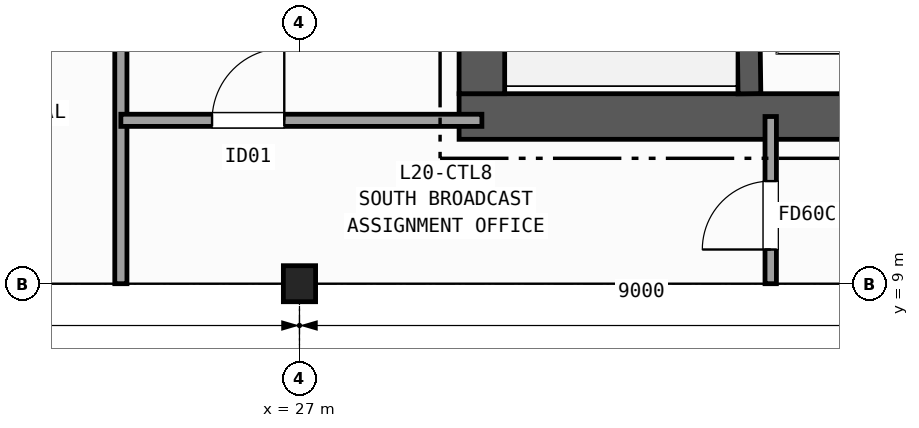
"""IFC4 building model, lengths in metres.
Left out: names, types, materials, properties, quantities, classifications, styles, units other than length and angle.
Written with IfcOpenShell. Run it as: python <this file> out.ifc"""

import sys

from ifc_helpers import new_model, si_unit, direction, frame, frame_2d, origin, origin_2d, place, context, subcontext, project, spatial, rectangle, i_section, extrude, element, fill, save


model = new_model("IFC4")
c1 = context("Model", 3, precision=1e-05, world=origin(), true_north=direction((0.0, 1.0)))
c2 = subcontext(c1, "Body", "Model", "MODEL_VIEW")
j1 = project(units=[si_unit("LENGTHUNIT", "METRE"), si_unit("PLANEANGLEUNIT", "RADIAN")], contexts=[c1])
p1 = place(None, origin())
s1 = spatial("IfcSite", under=j1, at=p1, CompositionType="ELEMENT")
p2 = place(p1, origin())
s2 = spatial("IfcBuilding", under=s1, at=p2, CompositionType="ELEMENT")
p3 = place(p2, frame((0.0, 0.0, 84.1)))
s3 = spatial("IfcBuildingStorey", under=s2, at=p3, CompositionType="ELEMENT", Elevation=84.1)
p4 = place(p3, frame((27.0, 9.0, 0.0), z_axis=(0.0, 0.0, 1.0), x_axis=(1.0, 0.0, 0.0)))
e1 = element("IfcColumn", 1, at=p4, inside=s3, PredefinedType="COLUMN", context=c2, shape_type="SweptSolid", body=[
    extrude(i_section(OverallWidth=0.424, OverallDepth=0.474, WebThickness=0.048, FlangeThickness=0.077, FilletRadius=0.015, at=origin_2d()), origin(), (0.0, 0.0, 1.0), 5.0),
])
p5 = place(p3, frame((29.1, 11.2, 0.0), z_axis=(0.0, 0.0, 1.0), x_axis=(1.0, 0.0, 0.0)))
e2 = element("IfcWall", 2, at=p5, inside=s3, PredefinedType="SHEAR", context=c2, shape_type="SweptSolid", body=[
    extrude(rectangle(XDim=14.0, YDim=0.6, at=frame_2d((7.0, 0.0))), origin(), (0.0, 0.0, 1.0), 4.72),
])
p6 = place(p3, frame((29.4, 24.3, 0.0), z_axis=(0.0, 0.0, 1.0), x_axis=(0.0, -1.0, 0.0)))
e3 = element("IfcWall", 3, at=p6, inside=s3, PredefinedType="SHEAR", context=c2, shape_type="SweptSolid", body=[
    extrude(rectangle(XDim=12.8, YDim=0.6, at=frame_2d((6.4, 0.0))), origin(), (0.0, 0.0, 1.0), 4.72),
])
p7 = place(p6, frame((1.4, 0.0, 0.0)))
e4 = element("IfcOpeningElement", 4, at=p7, cuts=e3, PredefinedType="OPENING", context=c2, shape_type="SweptSolid", body=[
    extrude(rectangle(XDim=1.35, YDim=2.15, at=frame_2d((0.675, 1.075))), frame((0.0, 0.31, 0.0), z_axis=(0.0, -1.0, 0.0), x_axis=(1.0, 0.0, 0.0)), (0.0, 0.0, 1.0), 0.62),
])
p8 = place(p3, frame((32.92, 11.5, 0.0), z_axis=(0.0, 0.0, 1.0), x_axis=(-0.013244407292, 0.999912288991, 0.0)))
e5 = element("IfcWall", 5, at=p8, inside=s3, PredefinedType="SHEAR", context=c2, shape_type="SweptSolid", body=[
    extrude(rectangle(XDim=9.051, YDim=0.3, at=frame_2d((4.525, 0.0))), origin(), (0.0, 0.0, 1.0), 4.72),
])
p9 = place(p3, frame((24.65, 9.0, 0.0), z_axis=(0.0, 0.0, 1.0), x_axis=(0.0, 1.0, 0.0)))
e6 = element("IfcWall", 6, at=p9, inside=s3, PredefinedType="PARTITIONING", context=c2, shape_type="SweptSolid", body=[
    extrude(rectangle(XDim=19.2, YDim=0.16, at=frame_2d((9.6, 0.0))), origin(), (0.0, 0.0, 1.0), 3.927),
])
p10 = place(p9, frame((12.2, 0.0, 0.0)))
e7 = element("IfcOpeningElement", 7, at=p10, cuts=e6, PredefinedType="OPENING", context=c2, shape_type="SweptSolid", body=[
    extrude(rectangle(XDim=0.95, YDim=2.1, at=frame_2d((0.475, 1.05))), frame((0.0, 0.09, 0.0), z_axis=(0.0, -1.0, 0.0), x_axis=(1.0, 0.0, 0.0)), (0.0, 0.0, 1.0), 0.18),
])
p11 = place(p9, frame((4.2, 0.0, 0.0)))
e8 = element("IfcOpeningElement", 8, at=p11, cuts=e6, PredefinedType="OPENING", context=c2, shape_type="SweptSolid", body=[
    extrude(rectangle(XDim=1.0, YDim=2.1, at=frame_2d((0.5, 1.05))), frame((0.0, 0.09, 0.0), z_axis=(0.0, -1.0, 0.0), x_axis=(1.0, 0.0, 0.0)), (0.0, 0.0, 1.0), 0.18),
])
p12 = place(p3, frame((24.65, 11.15, 0.0), z_axis=(0.0, 0.0, 1.0), x_axis=(1.0, 0.0, 0.0)))
e9 = element("IfcWall", 9, at=p12, inside=s3, PredefinedType="PARTITIONING", context=c2, shape_type="SweptSolid", body=[
    extrude(rectangle(XDim=4.75, YDim=0.16, at=frame_2d((2.375, 0.0))), origin(), (0.0, 0.0, 1.0), 4.092),
])
p13 = place(p12, frame((1.2, 0.0, 0.0)))
e10 = element("IfcOpeningElement", 10, at=p13, cuts=e9, PredefinedType="OPENING", context=c2, shape_type="SweptSolid", body=[
    extrude(rectangle(XDim=0.95, YDim=2.1, at=frame_2d((0.475, 1.05))), frame((0.0, 0.09, 0.0), z_axis=(0.0, -1.0, 0.0), x_axis=(1.0, 0.0, 0.0)), (0.0, 0.0, 1.0), 0.18),
])
p14 = place(p3, frame((33.2, 9.0, 0.0), z_axis=(0.0, 0.0, 1.0), x_axis=(0.0, 1.0, 0.0)))
e11 = element("IfcWall", 11, at=p14, inside=s3, PredefinedType="PARTITIONING", context=c2, shape_type="SweptSolid", body=[
    extrude(rectangle(XDim=2.2, YDim=0.15, at=frame_2d((1.1, 0.0))), origin(), (0.0, 0.0, 1.0), 3.927),
])
p15 = place(p14, frame((0.45, 0.0, 0.0)))
e12 = element("IfcOpeningElement", 12, at=p15, cuts=e11, PredefinedType="OPENING", context=c2, shape_type="SweptSolid", body=[
    extrude(rectangle(XDim=0.9, YDim=2.1, at=frame_2d((0.45, 1.05))), frame((0.0, 0.085, 0.0), z_axis=(0.0, -1.0, 0.0), x_axis=(1.0, 0.0, 0.0)), (0.0, 0.0, 1.0), 0.17),
])
p16 = place(p13, origin())
e13 = element("IfcDoor", 13, at=p16, inside=s3, OperationType="SINGLE_SWING_RIGHT", PredefinedType="DOOR", context=c2, shape_type="SweptSolid", body=[
    extrude(rectangle(XDim=0.95, YDim=2.1, at=frame_2d((0.475, 1.05))), frame((0.0, 0.025, 0.0), z_axis=(0.0, -1.0, 0.0), x_axis=(1.0, 0.0, 0.0)), (0.0, 0.0, 1.0), 0.05),
])
fill(e10, e13)
p17 = place(p15, origin())
e14 = element("IfcDoor", 14, at=p17, inside=s3, OperationType="SINGLE_SWING_LEFT", PredefinedType="DOOR", context=c2, shape_type="SweptSolid", body=[
    extrude(rectangle(XDim=0.9, YDim=2.1, at=frame_2d((0.45, 1.05))), frame((0.0, 0.025, 0.0), z_axis=(0.0, -1.0, 0.0), x_axis=(1.0, 0.0, 0.0)), (0.0, 0.0, 1.0), 0.05),
])
fill(e12, e14)
save(model, sys.argv[1])
